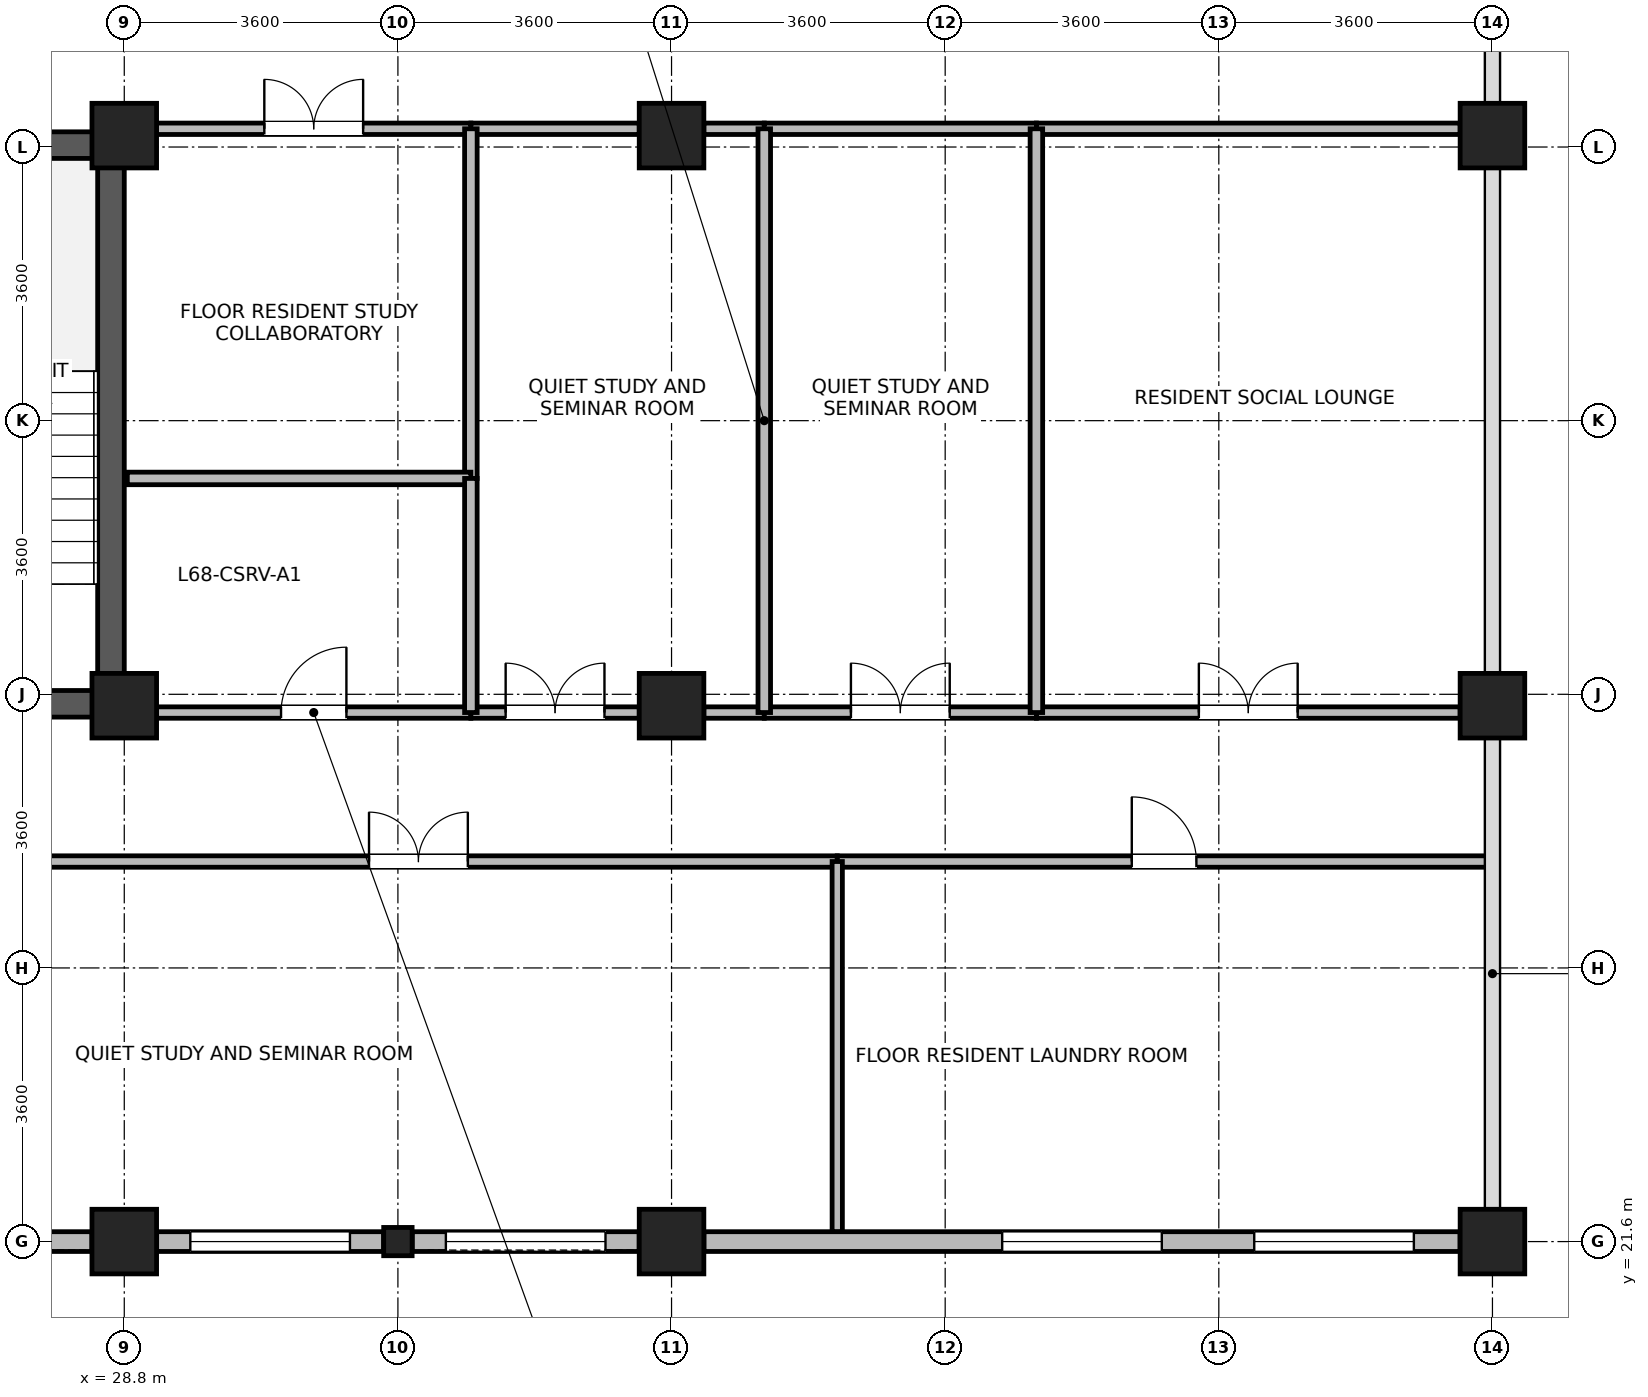
"""IFC4 building model, lengths in metres.
Left out: names, types, materials, properties, quantities, classifications, styles, units other than length and angle.
Written with IfcOpenShell. Run it as: python <this file> out.ifc"""

import sys

from ifc_helpers import new_model, si_unit, direction, frame, frame_2d, origin, origin_2d, place, context, subcontext, project, spatial, rectangle, i_section, extrude, source, transform, mapped, element, fill, save


model = new_model("IFC4")
c1 = context("Model", 3, precision=1e-05, world=origin(), true_north=direction((0.0, 1.0)))
c2 = subcontext(c1, "Body", "Model", "MODEL_VIEW")
j1 = project(units=[si_unit("LENGTHUNIT", "METRE"), si_unit("PLANEANGLEUNIT", "RADIAN")], contexts=[c1])
p1 = place(None, origin())
s1 = spatial("IfcSite", under=j1, at=p1, CompositionType="ELEMENT")
p2 = place(p1, origin())
s2 = spatial("IfcBuilding", under=s1, at=p2, CompositionType="ELEMENT")
p3 = place(p2, frame((0.0, 0.0, 264.7)))
s3 = spatial("IfcBuildingStorey", under=s2, at=p3, CompositionType="ELEMENT", Elevation=264.7)
p4 = place(p3, frame((28.625, 28.5, 0.0), z_axis=(0.0, 0.0, 1.0), x_axis=(0.0, 1.0, 0.0)))
e1 = element("IfcWall", 1, at=p4, inside=s3, PredefinedType="SHEAR", context=c2, shape_type="SweptSolid", body=[
    extrude(rectangle(XDim=7.7, YDim=0.35, at=frame_2d((3.85, 0.0))), origin(), (0.0, 0.0, 1.0), 3.475),
])
for number, where, z_axis, x_axis in (
    (2, (25.25, 28.675, 0.0), (0.0, 0.0, 1.0), (1.0, 0.0, 0.0)),
    (3, (25.25, 36.025, 0.0), (0.0, 0.0, 1.0), (1.0, 0.0, 0.0)),
):
    element("IfcWall", number, at=place(p3, frame(where, z_axis=z_axis, x_axis=x_axis)), inside=s3, PredefinedType="SHEAR", context=c2, shape_type="SweptSolid", body=[
        extrude(rectangle(XDim=3.2, YDim=0.35, at=frame_2d((1.6, 0.0))), origin(), (0.0, 0.0, 1.0), 3.475),
    ])
m1 = source(origin(), c2, "Body", "SweptSolid", [
    extrude(rectangle(XDim=0.85, YDim=0.85, at=origin_2d()), origin(), (0.0, 0.0, 1.0), 3.7),
])
for number, where, z_axis, x_axis in (
    (4, (28.8, 21.6, 0.0), (0.0, 0.0, 1.0), (1.0, 0.0, 0.0)),
    (5, (28.8, 28.65, 0.0), (0.0, 0.0, 1.0), (1.0, 0.0, 0.0)),
    (6, (28.8, 36.15, 0.0), (0.0, 0.0, 1.0), (1.0, 0.0, 0.0)),
    (7, (36.0, 21.6, 0.0), (0.0, 0.0, 1.0), (1.0, 0.0, 0.0)),
    (8, (36.0, 28.65, 0.0), (0.0, 0.0, 1.0), (1.0, 0.0, 0.0)),
    (9, (36.0, 36.15, 0.0), (0.0, 0.0, 1.0), (1.0, 0.0, 0.0)),
    (10, (46.8, 21.6, 0.0), (0.0, 0.0, 1.0), (1.0, 0.0, 0.0)),
    (11, (46.8, 28.65, 0.0), (0.0, 0.0, 1.0), (1.0, 0.0, 0.0)),
    (12, (46.8, 36.15, 0.0), (0.0, 0.0, 1.0), (1.0, 0.0, 0.0)),
):
    element("IfcColumn", number, at=place(p3, frame(where, z_axis=z_axis, x_axis=x_axis)), inside=s3, PredefinedType="COLUMN", context=c2, shape_type="MappedRepresentation", body=[
        mapped(m1, transform((0.0, 0.0, 0.0), x_axis=(1.0, 0.0, 0.0), y_axis=(0.0, 1.0, 0.0), z_axis=(0.0, 0.0, 1.0), scale=1.0)),
    ])
m2 = source(origin(), c2, "Body", "SweptSolid", [
    extrude(i_section(OverallWidth=0.374, OverallDepth=0.372, WebThickness=0.015, FlangeThickness=0.026, FilletRadius=0.015, at=origin_2d()), origin(), (0.0, 0.0, 1.0), 3.7),
])
p5 = place(p3, frame((32.4, 21.6, 0.0), z_axis=(0.0, 0.0, 1.0), x_axis=(1.0, 0.0, 0.0)))
e13 = element("IfcColumn", 13, at=p5, inside=s3, PredefinedType="COLUMN", context=c2, shape_type="MappedRepresentation", body=[
    mapped(m2, transform((0.0, 0.0, 0.0), x_axis=(1.0, 0.0, 0.0), y_axis=(0.0, 1.0, 0.0), z_axis=(0.0, 0.0, 1.0), scale=1.0)),
])
p6 = place(p3, frame((28.374, 21.6, 0.0), z_axis=(0.0, 0.0, 1.0), x_axis=(-1.0, 0.0, 0.0)))
e14 = element("IfcWall", 14, at=p6, inside=s3, PredefinedType="STANDARD", context=c2, shape_type="SweptSolid", body=[
    extrude(rectangle(XDim=2.986, YDim=0.26, at=frame_2d((1.493, 0.0))), origin(), (0.0, 0.0, 1.0), 3.055),
])
p7 = place(p6, frame((1.759, 0.0, 0.85)))
e15 = element("IfcOpeningElement", 15, at=p7, cuts=e14, PredefinedType="OPENING", context=c2, shape_type="SweptSolid", body=[
    extrude(rectangle(XDim=0.95, YDim=1.75, at=frame_2d((0.475, 0.875))), frame((0.0, 0.14, 0.0), z_axis=(0.0, -1.0, 0.0), x_axis=(1.0, 0.0, 0.0)), (0.0, 0.0, 1.0), 0.28),
])
p8 = place(p3, frame((32.212, 21.6, 0.0), z_axis=(0.0, 0.0, 1.0), x_axis=(-1.0, 0.0, 0.0)))
e16 = element("IfcWall", 16, at=p8, inside=s3, PredefinedType="STANDARD", context=c2, shape_type="SweptSolid", body=[
    extrude(rectangle(XDim=2.986, YDim=0.26, at=frame_2d((1.493, 0.0))), origin(), (0.0, 0.0, 1.0), 3.055),
])
p9 = place(p8, frame((0.443, 0.0, 0.85)))
e17 = element("IfcOpeningElement", 17, at=p9, cuts=e16, PredefinedType="OPENING", context=c2, shape_type="SweptSolid", body=[
    extrude(rectangle(XDim=2.1, YDim=1.95, at=frame_2d((1.05, 0.975))), frame((0.0, 0.14, 0.0), z_axis=(0.0, -1.0, 0.0), x_axis=(1.0, 0.0, 0.0)), (0.0, 0.0, 1.0), 0.28),
])
p10 = place(p3, frame((35.574, 21.6, 0.0), z_axis=(0.0, 0.0, 1.0), x_axis=(-1.0, 0.0, 0.0)))
e18 = element("IfcWall", 18, at=p10, inside=s3, PredefinedType="STANDARD", context=c2, shape_type="SweptSolid", body=[
    extrude(rectangle(XDim=2.986, YDim=0.26, at=frame_2d((1.493, 0.0))), origin(), (0.0, 0.0, 1.0), 3.055),
])
p11 = place(p10, frame((0.443, 0.0, 0.85)))
e19 = element("IfcOpeningElement", 19, at=p11, cuts=e18, PredefinedType="OPENING", context=c2, shape_type="SweptSolid", body=[
    extrude(rectangle(XDim=2.1, YDim=1.95, at=frame_2d((1.05, 0.975))), frame((0.0, 0.14, 0.0), z_axis=(0.0, -1.0, 0.0), x_axis=(1.0, 0.0, 0.0)), (0.0, 0.0, 1.0), 0.28),
])
p12 = place(p3, frame((46.374, 21.6, 0.0), z_axis=(0.0, 0.0, 1.0), x_axis=(-1.0, 0.0, 0.0)))
e20 = element("IfcWall", 20, at=p12, inside=s3, PredefinedType="STANDARD", context=c2, shape_type="SweptSolid", body=[
    extrude(rectangle(XDim=9.948, YDim=0.26, at=frame_2d((4.974, 0.0))), origin(), (0.0, 0.0, 1.0), 3.055),
])
p13 = place(p12, frame((0.608, 0.0, 0.85)))
e21 = element("IfcOpeningElement", 21, at=p13, cuts=e20, PredefinedType="OPENING", context=c2, shape_type="SweptSolid", body=[
    extrude(rectangle(XDim=2.1, YDim=1.95, at=frame_2d((1.05, 0.975))), frame((0.0, 0.14, 0.0), z_axis=(0.0, -1.0, 0.0), x_axis=(1.0, 0.0, 0.0)), (0.0, 0.0, 1.0), 0.28),
])
p14 = place(p12, frame((3.924, 0.0, 0.85)))
e22 = element("IfcOpeningElement", 22, at=p14, cuts=e20, PredefinedType="OPENING", context=c2, shape_type="SweptSolid", body=[
    extrude(rectangle(XDim=2.1, YDim=1.95, at=frame_2d((1.05, 0.975))), frame((0.0, 0.14, 0.0), z_axis=(0.0, -1.0, 0.0), x_axis=(1.0, 0.0, 0.0)), (0.0, 0.0, 1.0), 0.28),
])
p15 = place(p3, frame((27.16, 26.6, 0.0), z_axis=(0.0, 0.0, 1.0), x_axis=(1.0, 0.0, 0.0)))
e23 = element("IfcWall", 23, at=p15, inside=s3, PredefinedType="PARTITIONING", context=c2, shape_type="SweptSolid", body=[
    extrude(rectangle(XDim=11.02, YDim=0.15, at=frame_2d((5.51, 0.0))), origin(), (0.0, 0.0, 1.0), 3.455),
])
p16 = place(p15, frame((4.86, 0.0, 0.0)))
e24 = element("IfcOpeningElement", 24, at=p16, cuts=e23, PredefinedType="OPENING", context=c2, shape_type="SweptSolid", body=[
    extrude(rectangle(XDim=1.3, YDim=2.12, at=frame_2d((0.65, 1.06))), frame((0.0, 0.085, 0.0), z_axis=(0.0, -1.0, 0.0), x_axis=(1.0, 0.0, 0.0)), (0.0, 0.0, 1.0), 0.17),
])
p17 = place(p3, frame((38.18, 26.6, 0.0), z_axis=(0.0, 0.0, 1.0), x_axis=(1.0, 0.0, 0.0)))
e25 = element("IfcWall", 25, at=p17, inside=s3, PredefinedType="PARTITIONING", context=c2, shape_type="SweptSolid", body=[
    extrude(rectangle(XDim=8.6, YDim=0.15, at=frame_2d((4.3, 0.0))), origin(), (0.0, 0.0, 1.0), 3.455),
])
p18 = place(p17, frame((3.875, 0.0, 0.0)))
e26 = element("IfcOpeningElement", 26, at=p18, cuts=e25, PredefinedType="OPENING", context=c2, shape_type="SweptSolid", body=[
    extrude(rectangle(XDim=0.85, YDim=2.04, at=frame_2d((0.425, 1.02))), frame((0.0, 0.085, 0.0), z_axis=(0.0, -1.0, 0.0), x_axis=(1.0, 0.0, 0.0)), (0.0, 0.0, 1.0), 0.17),
])
p19 = place(p3, frame((40.8, 28.56, 0.0), z_axis=(0.0, 0.0, 1.0), x_axis=(1.0, 0.0, 0.0)))
e27 = element("IfcWall", 27, at=p19, inside=s3, PredefinedType="PARTITIONING", context=c2, shape_type="SweptSolid", body=[
    extrude(rectangle(XDim=5.575, YDim=0.15, at=frame_2d((2.788, 0.0))), origin(), (0.0, 0.0, 1.0), 2.905),
])
p20 = place(p19, frame((2.137, 0.0, 0.0)))
e28 = element("IfcOpeningElement", 28, at=p20, cuts=e27, PredefinedType="OPENING", context=c2, shape_type="SweptSolid", body=[
    extrude(rectangle(XDim=1.3, YDim=2.12, at=frame_2d((0.65, 1.06))), frame((0.0, 0.085, 0.0), z_axis=(0.0, -1.0, 0.0), x_axis=(1.0, 0.0, 0.0)), (0.0, 0.0, 1.0), 0.17),
])
p21 = place(p3, frame((40.8, 36.24, 0.0), z_axis=(0.0, 0.0, 1.0), x_axis=(1.0, 0.0, 0.0)))
e29 = element("IfcWall", 29, at=p21, inside=s3, PredefinedType="PARTITIONING", context=c2, shape_type="SweptSolid", body=[
    extrude(rectangle(XDim=5.575, YDim=0.15, at=frame_2d((2.788, 0.0))), origin(), (0.0, 0.0, 1.0), 2.905),
])
p22 = place(p3, frame((29.225, 28.56, 0.0), z_axis=(0.0, 0.0, 1.0), x_axis=(1.0, 0.0, 0.0)))
e30 = element("IfcWall", 30, at=p22, inside=s3, PredefinedType="PARTITIONING", context=c2, shape_type="SweptSolid", body=[
    extrude(rectangle(XDim=4.135, YDim=0.15, at=frame_2d((2.067, 0.0))), origin(), (0.0, 0.0, 1.0), 2.905),
])
p23 = place(p22, frame((1.637, 0.0, 0.0)))
e31 = element("IfcOpeningElement", 31, at=p23, cuts=e30, PredefinedType="OPENING", context=c2, shape_type="SweptSolid", body=[
    extrude(rectangle(XDim=0.86, YDim=2.02, at=frame_2d((0.43, 1.01))), frame((0.0, 0.085, 0.0), z_axis=(0.0, -1.0, 0.0), x_axis=(1.0, 0.0, 0.0)), (0.0, 0.0, 1.0), 0.17),
])
p24 = place(p3, frame((29.225, 36.24, 0.0), z_axis=(0.0, 0.0, 1.0), x_axis=(1.0, 0.0, 0.0)))
e32 = element("IfcWall", 32, at=p24, inside=s3, PredefinedType="PARTITIONING", context=c2, shape_type="SweptSolid", body=[
    extrude(rectangle(XDim=4.135, YDim=0.15, at=frame_2d((2.067, 0.0))), origin(), (0.0, 0.0, 1.0), 2.905),
])
p25 = place(p24, frame((1.417, 0.0, 0.0)))
e33 = element("IfcOpeningElement", 33, at=p25, cuts=e32, PredefinedType="OPENING", context=c2, shape_type="SweptSolid", body=[
    extrude(rectangle(XDim=1.3, YDim=2.12, at=frame_2d((0.65, 1.06))), frame((0.0, 0.085, 0.0), z_axis=(0.0, -1.0, 0.0), x_axis=(1.0, 0.0, 0.0)), (0.0, 0.0, 1.0), 0.17),
])
p26 = place(p3, frame((33.36, 28.56, 0.0), z_axis=(0.0, 0.0, 1.0), x_axis=(1.0, 0.0, 0.0)))
e34 = element("IfcWall", 34, at=p26, inside=s3, PredefinedType="PARTITIONING", context=c2, shape_type="SweptSolid", body=[
    extrude(rectangle(XDim=2.215, YDim=0.15, at=frame_2d((1.107, 0.0))), origin(), (0.0, 0.0, 1.0), 2.905),
])
p27 = place(p26, frame((0.458, 0.0, 0.0)))
e35 = element("IfcOpeningElement", 35, at=p27, cuts=e34, PredefinedType="OPENING", context=c2, shape_type="SweptSolid", body=[
    extrude(rectangle(XDim=1.3, YDim=2.12, at=frame_2d((0.65, 1.06))), frame((0.0, 0.085, 0.0), z_axis=(0.0, -1.0, 0.0), x_axis=(1.0, 0.0, 0.0)), (0.0, 0.0, 1.0), 0.17),
])
p28 = place(p3, frame((36.425, 28.56, 0.0), z_axis=(0.0, 0.0, 1.0), x_axis=(1.0, 0.0, 0.0)))
e36 = element("IfcWall", 36, at=p28, inside=s3, PredefinedType="PARTITIONING", context=c2, shape_type="SweptSolid", body=[
    extrude(rectangle(XDim=0.795, YDim=0.15, at=frame_2d((0.397, 0.0))), origin(), (0.0, 0.0, 1.0), 2.905),
])
p29 = place(p3, frame((33.36, 36.24, 0.0), z_axis=(0.0, 0.0, 1.0), x_axis=(1.0, 0.0, 0.0)))
e37 = element("IfcWall", 37, at=p29, inside=s3, PredefinedType="PARTITIONING", context=c2, shape_type="SweptSolid", body=[
    extrude(rectangle(XDim=2.215, YDim=0.15, at=frame_2d((1.107, 0.0))), origin(), (0.0, 0.0, 1.0), 2.905),
])
p30 = place(p3, frame((36.425, 36.24, 0.0), z_axis=(0.0, 0.0, 1.0), x_axis=(1.0, 0.0, 0.0)))
e38 = element("IfcWall", 38, at=p30, inside=s3, PredefinedType="PARTITIONING", context=c2, shape_type="SweptSolid", body=[
    extrude(rectangle(XDim=0.795, YDim=0.15, at=frame_2d((0.397, 0.0))), origin(), (0.0, 0.0, 1.0), 2.905),
])
p31 = place(p3, frame((37.22, 28.56, 0.0), z_axis=(0.0, 0.0, 1.0), x_axis=(1.0, 0.0, 0.0)))
e39 = element("IfcWall", 39, at=p31, inside=s3, PredefinedType="PARTITIONING", context=c2, shape_type="SweptSolid", body=[
    extrude(rectangle(XDim=3.58, YDim=0.15, at=frame_2d((1.79, 0.0))), origin(), (0.0, 0.0, 1.0), 2.905),
])
p32 = place(p31, frame((1.14, 0.0, 0.0)))
e40 = element("IfcOpeningElement", 40, at=p32, cuts=e39, PredefinedType="OPENING", context=c2, shape_type="SweptSolid", body=[
    extrude(rectangle(XDim=1.3, YDim=2.12, at=frame_2d((0.65, 1.06))), frame((0.0, 0.085, 0.0), z_axis=(0.0, -1.0, 0.0), x_axis=(1.0, 0.0, 0.0)), (0.0, 0.0, 1.0), 0.17),
])
p33 = place(p3, frame((37.22, 36.24, 0.0), z_axis=(0.0, 0.0, 1.0), x_axis=(1.0, 0.0, 0.0)))
e41 = element("IfcWall", 41, at=p33, inside=s3, PredefinedType="PARTITIONING", context=c2, shape_type="SweptSolid", body=[
    extrude(rectangle(XDim=3.58, YDim=0.15, at=frame_2d((1.79, 0.0))), origin(), (0.0, 0.0, 1.0), 2.905),
])
for number, where, z_axis, x_axis in (
    (42, (37.22, 28.56, 0.0), (0.0, 0.0, 1.0), (0.0, 1.0, 0.0)),
    (43, (40.8, 28.56, 0.0), (0.0, 0.0, 1.0), (0.0, 1.0, 0.0)),
):
    element("IfcWall", number, at=place(p3, frame(where, z_axis=z_axis, x_axis=x_axis)), inside=s3, PredefinedType="PARTITIONING", context=c2, shape_type="SweptSolid", body=[
        extrude(rectangle(XDim=7.68, YDim=0.165, at=frame_2d((3.84, 0.0))), origin(), (0.0, 0.0, 1.0), 3.455),
    ])
p34 = place(p3, frame((38.18, 21.732, 0.0), z_axis=(0.0, 0.0, 1.0), x_axis=(0.0, 1.0, 0.0)))
e44 = element("IfcWall", 44, at=p34, inside=s3, PredefinedType="PARTITIONING", context=c2, shape_type="SweptSolid", body=[
    extrude(rectangle(XDim=4.868, YDim=0.135, at=frame_2d((2.434, 0.0))), origin(), (0.0, 0.0, 1.0), 3.455),
])
p35 = place(p3, frame((33.36, 31.64, 0.0), z_axis=(0.0, 0.0, 1.0), x_axis=(0.0, 1.0, 0.0)))
e45 = element("IfcWall", 45, at=p35, inside=s3, PredefinedType="PARTITIONING", context=c2, shape_type="SweptSolid", body=[
    extrude(rectangle(XDim=4.6, YDim=0.165, at=frame_2d((2.3, 0.0))), origin(), (0.0, 0.0, 1.0), 3.455),
])
p36 = place(p3, frame((28.84, 31.64, 0.0), z_axis=(0.0, 0.0, 1.0), x_axis=(1.0, 0.0, 0.0)))
e46 = element("IfcWall", 46, at=p36, inside=s3, PredefinedType="PARTITIONING", context=c2, shape_type="SweptSolid", body=[
    extrude(rectangle(XDim=4.52, YDim=0.165, at=frame_2d((2.26, 0.0))), origin(), (0.0, 0.0, 1.0), 3.455),
])
p37 = place(p3, frame((33.36, 28.56, 0.0), z_axis=(0.0, 0.0, 1.0), x_axis=(0.0, 1.0, 0.0)))
e47 = element("IfcWall", 47, at=p37, inside=s3, PredefinedType="PARTITIONING", context=c2, shape_type="SweptSolid", body=[
    extrude(rectangle(XDim=3.08, YDim=0.165, at=frame_2d((1.54, 0.0))), origin(), (0.0, 0.0, 1.0), 3.455),
])
p38 = place(p9, origin())
e48 = element("IfcWindow", 48, at=p38, inside=s3, PartitioningType="SINGLE_PANEL", PredefinedType="WINDOW", context=c2, shape_type="SweptSolid", body=[
    extrude(rectangle(XDim=2.1, YDim=1.95, at=frame_2d((1.05, 0.975))), frame((0.0, 0.03, 0.0), z_axis=(0.0, -1.0, 0.0), x_axis=(1.0, 0.0, 0.0)), (0.0, 0.0, 1.0), 0.06),
])
fill(e17, e48)
p39 = place(p11, origin())
e49 = element("IfcWindow", 49, at=p39, inside=s3, PartitioningType="SINGLE_PANEL", PredefinedType="WINDOW", context=c2, shape_type="SweptSolid", body=[
    extrude(rectangle(XDim=2.1, YDim=1.95, at=frame_2d((1.05, 0.975))), frame((0.0, 0.03, 0.0), z_axis=(0.0, -1.0, 0.0), x_axis=(1.0, 0.0, 0.0)), (0.0, 0.0, 1.0), 0.06),
])
fill(e19, e49)
p40 = place(p13, origin())
e50 = element("IfcWindow", 50, at=p40, inside=s3, PartitioningType="SINGLE_PANEL", PredefinedType="WINDOW", context=c2, shape_type="SweptSolid", body=[
    extrude(rectangle(XDim=2.1, YDim=1.95, at=frame_2d((1.05, 0.975))), frame((0.0, 0.03, 0.0), z_axis=(0.0, -1.0, 0.0), x_axis=(1.0, 0.0, 0.0)), (0.0, 0.0, 1.0), 0.06),
])
fill(e21, e50)
p41 = place(p14, origin())
e51 = element("IfcWindow", 51, at=p41, inside=s3, PartitioningType="SINGLE_PANEL", PredefinedType="WINDOW", context=c2, shape_type="SweptSolid", body=[
    extrude(rectangle(XDim=2.1, YDim=1.95, at=frame_2d((1.05, 0.975))), frame((0.0, 0.03, 0.0), z_axis=(0.0, -1.0, 0.0), x_axis=(1.0, 0.0, 0.0)), (0.0, 0.0, 1.0), 0.06),
])
fill(e22, e51)
p42 = place(p16, origin())
e52 = element("IfcDoor", 52, at=p42, inside=s3, OperationType="DOUBLE_DOOR_SINGLE_SWING", PredefinedType="DOOR", context=c2, shape_type="SweptSolid", body=[
    extrude(rectangle(XDim=1.3, YDim=2.12, at=frame_2d((0.65, 1.06))), frame((0.0, 0.025, 0.0), z_axis=(0.0, -1.0, 0.0), x_axis=(1.0, 0.0, 0.0)), (0.0, 0.0, 1.0), 0.05),
])
fill(e24, e52)
p43 = place(p18, origin())
e53 = element("IfcDoor", 53, at=p43, inside=s3, OperationType="SINGLE_SWING_LEFT", PredefinedType="DOOR", context=c2, shape_type="SweptSolid", body=[
    extrude(rectangle(XDim=0.85, YDim=2.04, at=frame_2d((0.425, 1.02))), frame((0.0, 0.025, 0.0), z_axis=(0.0, -1.0, 0.0), x_axis=(1.0, 0.0, 0.0)), (0.0, 0.0, 1.0), 0.05),
])
fill(e26, e53)
p44 = place(p20, origin())
e54 = element("IfcDoor", 54, at=p44, inside=s3, OperationType="DOUBLE_DOOR_SINGLE_SWING", PredefinedType="DOOR", context=c2, shape_type="SweptSolid", body=[
    extrude(rectangle(XDim=1.3, YDim=2.12, at=frame_2d((0.65, 1.06))), frame((0.0, 0.025, 0.0), z_axis=(0.0, -1.0, 0.0), x_axis=(1.0, 0.0, 0.0)), (0.0, 0.0, 1.0), 0.05),
])
fill(e28, e54)
p45 = place(p23, origin())
e55 = element("IfcDoor", 55, at=p45, inside=s3, OperationType="SINGLE_SWING_RIGHT", PredefinedType="DOOR", context=c2, shape_type="SweptSolid", body=[
    extrude(rectangle(XDim=0.86, YDim=2.02, at=frame_2d((0.43, 1.01))), frame((0.0, 0.025, 0.0), z_axis=(0.0, -1.0, 0.0), x_axis=(1.0, 0.0, 0.0)), (0.0, 0.0, 1.0), 0.05),
])
fill(e31, e55)
p46 = place(p25, origin())
e56 = element("IfcDoor", 56, at=p46, inside=s3, OperationType="DOUBLE_DOOR_SINGLE_SWING", PredefinedType="DOOR", context=c2, shape_type="SweptSolid", body=[
    extrude(rectangle(XDim=1.3, YDim=2.12, at=frame_2d((0.65, 1.06))), frame((0.0, 0.025, 0.0), z_axis=(0.0, -1.0, 0.0), x_axis=(1.0, 0.0, 0.0)), (0.0, 0.0, 1.0), 0.05),
])
fill(e33, e56)
p47 = place(p27, origin())
e57 = element("IfcDoor", 57, at=p47, inside=s3, OperationType="DOUBLE_DOOR_SINGLE_SWING", PredefinedType="DOOR", context=c2, shape_type="SweptSolid", body=[
    extrude(rectangle(XDim=1.3, YDim=2.12, at=frame_2d((0.65, 1.06))), frame((0.0, 0.025, 0.0), z_axis=(0.0, -1.0, 0.0), x_axis=(1.0, 0.0, 0.0)), (0.0, 0.0, 1.0), 0.05),
])
fill(e35, e57)
p48 = place(p32, origin())
e58 = element("IfcDoor", 58, at=p48, inside=s3, OperationType="DOUBLE_DOOR_SINGLE_SWING", PredefinedType="DOOR", context=c2, shape_type="SweptSolid", body=[
    extrude(rectangle(XDim=1.3, YDim=2.12, at=frame_2d((0.65, 1.06))), frame((0.0, 0.025, 0.0), z_axis=(0.0, -1.0, 0.0), x_axis=(1.0, 0.0, 0.0)), (0.0, 0.0, 1.0), 0.05),
])
fill(e40, e58)
save(model, sys.argv[1])
